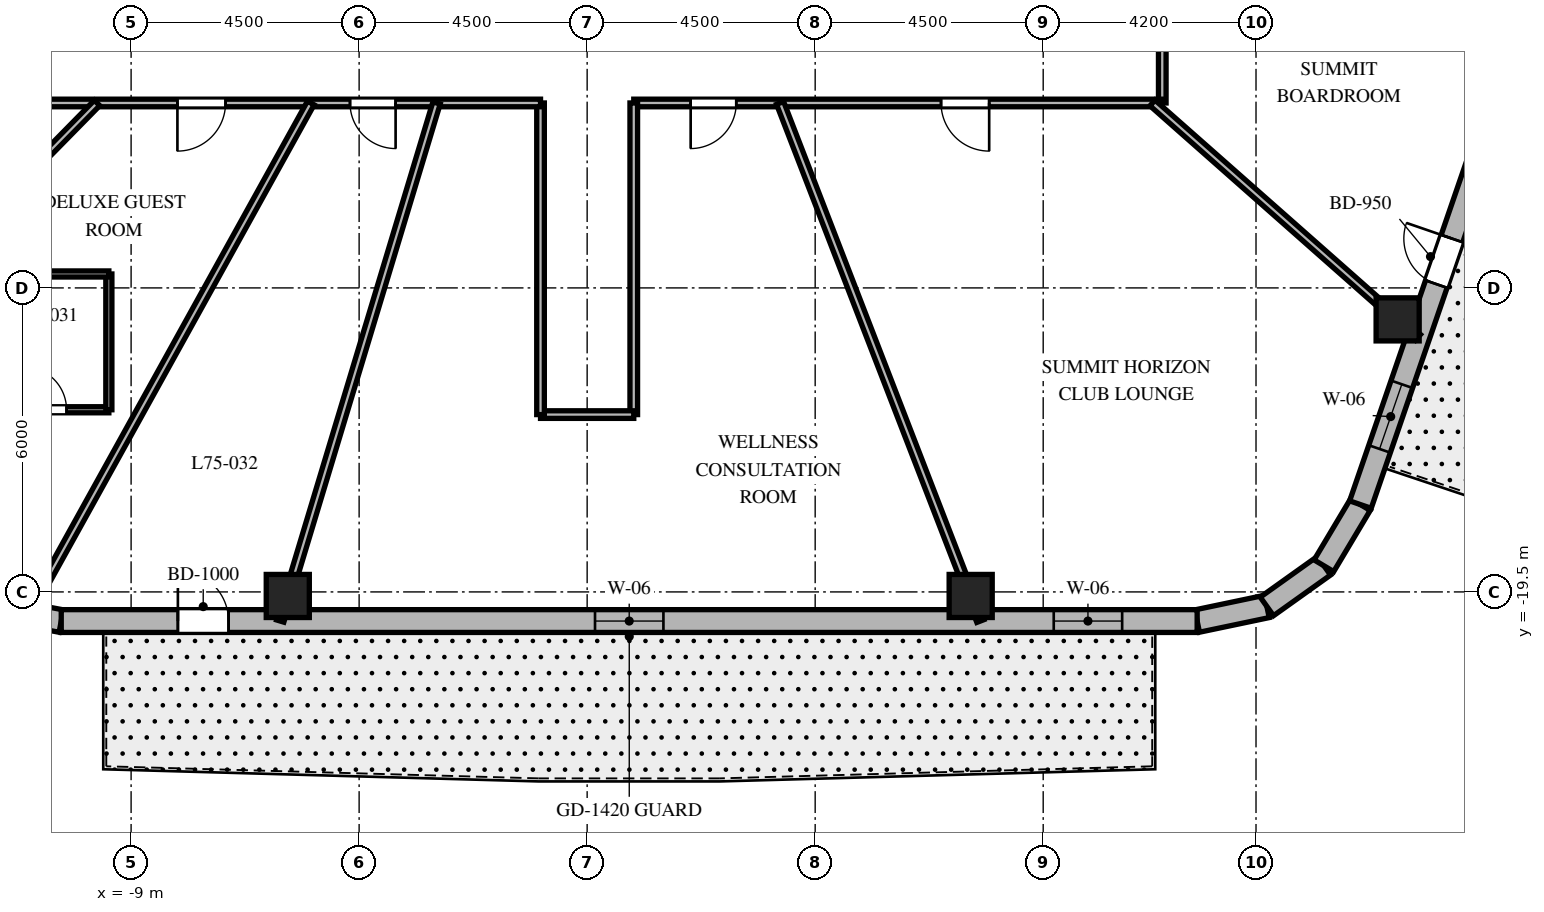
"""IFC4 building model, lengths in metres.
Left out: names, types, materials, properties, quantities, classifications, styles, units other than length and angle.
Written with IfcOpenShell. Run it as: python <this file> out.ifc"""

import sys

from ifc_helpers import new_model, si_unit, direction, frame, frame_2d, origin, origin_2d, place, context, subcontext, project, spatial, rectangle, extrude, element, fill, save


model = new_model("IFC4")
c1 = context("Model", 3, precision=1e-05, world=origin(), true_north=direction((0.0, 1.0)))
c2 = subcontext(c1, "Body", "Model", "MODEL_VIEW")
j1 = project(units=[si_unit("LENGTHUNIT", "METRE"), si_unit("PLANEANGLEUNIT", "RADIAN")], contexts=[c1])
p1 = place(None, origin())
s1 = spatial("IfcSite", under=j1, at=p1, CompositionType="ELEMENT")
p2 = place(p1, origin())
s2 = spatial("IfcBuilding", under=s1, at=p2, CompositionType="ELEMENT")
p3 = place(p2, frame((0.0, 0.0, 301.5)))
s3 = spatial("IfcBuildingStorey", under=s2, at=p3, CompositionType="ELEMENT", Elevation=301.5)
for number, where, z_axis, x_axis in (
    (1, (-5.908, -19.58, 0.0), (0.0, 0.0, 1.0), (1.0, 0.0, 0.0)),
    (2, (7.569, -19.58, 0.0), (0.0, 0.0, 1.0), (1.0, 0.0, 0.0)),
    (3, (15.995, -14.121, 0.0), (0.0, 0.0, 1.0), (1.0, 0.0, 0.0)),
):
    element("IfcColumn", number, at=place(p3, frame(where, z_axis=z_axis, x_axis=x_axis)), inside=s3, PredefinedType="COLUMN", context=c2, shape_type="SweptSolid", body=[
        extrude(rectangle(XDim=0.85, YDim=0.85, at=origin_2d()), origin(), (0.0, 0.0, 1.0), 3.9),
    ])
p4 = place(p3, frame((-11.626, -19.84, 0.0), z_axis=(0.0, 0.0, 1.0), x_axis=(0.982701956681, -0.185194126083, 0.0)))
e4 = element("IfcWall", 4, at=p4, inside=s3, PredefinedType="SOLIDWALL", context=c2, shape_type="SweptSolid", body=[
    extrude(rectangle(XDim=1.27, YDim=0.45, at=frame_2d((0.635, 0.0))), origin(), (0.0, 0.0, 1.0), 3.58),
])
p5 = place(p3, frame((12.038, -20.075, 0.0), z_axis=(0.0, 0.0, 1.0), x_axis=(0.978750122553, 0.205056571711, 0.0)))
e5 = element("IfcWall", 5, at=p5, inside=s3, PredefinedType="SOLIDWALL", context=c2, shape_type="SweptSolid", body=[
    extrude(rectangle(XDim=1.406, YDim=0.45, at=frame_2d((0.703, 0.0))), origin(), (0.0, 0.0, 1.0), 3.58),
])
p6 = place(p3, frame((13.415, -19.787, 0.0), z_axis=(0.0, 0.0, 1.0), x_axis=(0.814055493997, 0.580787097561, 0.0)))
e6 = element("IfcWall", 6, at=p6, inside=s3, PredefinedType="SOLIDWALL", context=c2, shape_type="SweptSolid", body=[
    extrude(rectangle(XDim=1.383, YDim=0.45, at=frame_2d((0.691, 0.0))), origin(), (0.0, 0.0, 1.0), 3.58),
])
p7 = place(p3, frame((14.54, -18.984, 0.0), z_axis=(0.0, 0.0, 1.0), x_axis=(0.512374906623, 0.858761873317, 0.0)))
e7 = element("IfcWall", 7, at=p7, inside=s3, PredefinedType="SOLIDWALL", context=c2, shape_type="SweptSolid", body=[
    extrude(rectangle(XDim=1.406, YDim=0.45, at=frame_2d((0.703, 0.0))), origin(), (0.0, 0.0, 1.0), 3.58),
])
p8 = place(p3, frame((-10.379, -20.075, 0.0), z_axis=(0.0, 0.0, 1.0), x_axis=(1.0, 0.0, 0.0)))
e8 = element("IfcWall", 8, at=p8, inside=s3, PredefinedType="SOLIDWALL", context=c2, shape_type="SweptSolid", body=[
    extrude(rectangle(XDim=22.417, YDim=0.45, at=frame_2d((11.208, 0.0))), origin(), (0.0, 0.0, 1.0), 3.58),
])
p9 = place(p8, frame((2.302, 0.0, 0.0)))
e9 = element("IfcOpeningElement", 9, at=p9, cuts=e8, PredefinedType="OPENING", context=c2, shape_type="SweptSolid", body=[
    extrude(rectangle(XDim=1.0, YDim=2.15, at=frame_2d((0.5, 1.075))), frame((0.0, 0.235, 0.0), z_axis=(0.0, -1.0, 0.0), x_axis=(1.0, 0.0, 0.0)), (0.0, 0.0, 1.0), 0.47),
])
p10 = place(p8, frame((10.534, 0.0, 0.8)))
e10 = element("IfcOpeningElement", 10, at=p10, cuts=e8, PredefinedType="OPENING", context=c2, shape_type="SweptSolid", body=[
    extrude(rectangle(XDim=1.35, YDim=1.75, at=frame_2d((0.675, 0.875))), frame((0.0, 0.235, 0.0), z_axis=(0.0, -1.0, 0.0), x_axis=(1.0, 0.0, 0.0)), (0.0, 0.0, 1.0), 0.47),
])
p11 = place(p8, frame((19.587, 0.0, 0.8)))
e11 = element("IfcOpeningElement", 11, at=p11, cuts=e8, PredefinedType="OPENING", context=c2, shape_type="SweptSolid", body=[
    extrude(rectangle(XDim=1.35, YDim=1.75, at=frame_2d((0.675, 0.875))), frame((0.0, 0.235, 0.0), z_axis=(0.0, -1.0, 0.0), x_axis=(1.0, 0.0, 0.0)), (0.0, 0.0, 1.0), 0.47),
])
p12 = place(p3, frame((15.26, -17.776, 0.0), z_axis=(0.0, 0.0, 1.0), x_axis=(0.325407437101, 0.945573899745, 0.0)))
e12 = element("IfcWall", 12, at=p12, inside=s3, PredefinedType="SOLIDWALL", context=c2, shape_type="SweptSolid", body=[
    extrude(rectangle(XDim=18.552, YDim=0.45, at=frame_2d((9.276, 0.0))), origin(), (0.0, 0.0, 1.0), 3.58),
])
p13 = place(p12, frame((4.602, 0.0, 0.0)))
e13 = element("IfcOpeningElement", 13, at=p13, cuts=e12, PredefinedType="OPENING", context=c2, shape_type="SweptSolid", body=[
    extrude(rectangle(XDim=0.95, YDim=2.15, at=frame_2d((0.475, 1.075))), frame((0.0, 0.235, 0.0), z_axis=(0.0, -1.0, 0.0), x_axis=(1.0, 0.0, 0.0)), (0.0, 0.0, 1.0), 0.47),
])
p14 = place(p12, frame((1.161, 0.0, 0.8)))
e14 = element("IfcOpeningElement", 14, at=p14, cuts=e12, PredefinedType="OPENING", context=c2, shape_type="SweptSolid", body=[
    extrude(rectangle(XDim=1.35, YDim=1.75, at=frame_2d((0.675, 0.875))), frame((0.0, 0.235, 0.0), z_axis=(0.0, -1.0, 0.0), x_axis=(1.0, 0.0, 0.0)), (0.0, 0.0, 1.0), 0.47),
])
p15 = place(p12, frame((8.548, 0.0, 0.8)))
e15 = element("IfcOpeningElement", 15, at=p15, cuts=e12, PredefinedType="OPENING", context=c2, shape_type="SweptSolid", body=[
    extrude(rectangle(XDim=1.35, YDim=1.75, at=frame_2d((0.675, 0.875))), frame((0.0, 0.235, 0.0), z_axis=(0.0, -1.0, 0.0), x_axis=(1.0, 0.0, 0.0)), (0.0, 0.0, 1.0), 0.47),
])
p16 = place(p12, frame((15.987, 0.0, 0.8)))
e16 = element("IfcOpeningElement", 16, at=p16, cuts=e12, PredefinedType="OPENING", context=c2, shape_type="SweptSolid", body=[
    extrude(rectangle(XDim=1.35, YDim=1.75, at=frame_2d((0.675, 0.875))), frame((0.0, 0.235, 0.0), z_axis=(0.0, -1.0, 0.0), x_axis=(1.0, 0.0, 0.0)), (0.0, 0.0, 1.0), 0.47),
])
p17 = place(p3, frame((11.35, -4.4, 0.0), z_axis=(0.0, 0.0, 1.0), x_axis=(0.0, -1.0, 0.0)))
e17 = element("IfcWall", 17, at=p17, inside=s3, PredefinedType="PARTITIONING", context=c2, shape_type="SweptSolid", body=[
    extrude(rectangle(XDim=5.45, YDim=0.15, at=frame_2d((2.725, 0.0))), origin(), (0.0, 0.0, 1.0), 2.17),
])
p18 = place(p3, frame((11.35, -9.85, 0.0), z_axis=(0.0, 0.0, 1.0), x_axis=(-1.0, 0.0, 0.0)))
e18 = element("IfcWall", 18, at=p18, inside=s3, PredefinedType="PARTITIONING", context=c2, shape_type="SweptSolid", body=[
    extrude(rectangle(XDim=10.43, YDim=0.15, at=frame_2d((5.215, 0.0))), origin(), (0.0, 0.0, 1.0), 2.17),
])
p19 = place(p18, frame((8.407, 0.0, 0.0)))
e19 = element("IfcOpeningElement", 19, at=p19, cuts=e18, PredefinedType="OPENING", context=c2, shape_type="SweptSolid", body=[
    extrude(rectangle(XDim=0.9, YDim=2.03, at=frame_2d((0.45, 1.015))), frame((0.0, 0.085, 0.0), z_axis=(0.0, -1.0, 0.0), x_axis=(1.0, 0.0, 0.0)), (0.0, 0.0, 1.0), 0.17),
])
p20 = place(p18, frame((3.416, 0.0, 0.0)))
e20 = element("IfcOpeningElement", 20, at=p20, cuts=e18, PredefinedType="OPENING", context=c2, shape_type="SweptSolid", body=[
    extrude(rectangle(XDim=0.95, YDim=2.03, at=frame_2d((0.475, 1.015))), frame((0.0, 0.085, 0.0), z_axis=(0.0, -1.0, 0.0), x_axis=(1.0, 0.0, 0.0)), (0.0, 0.0, 1.0), 0.17),
])
p21 = place(p3, frame((0.92, -9.85, 0.0), z_axis=(0.0, 0.0, 1.0), x_axis=(0.0, -1.0, 0.0)))
e21 = element("IfcWall", 21, at=p21, inside=s3, PredefinedType="PARTITIONING", context=c2, shape_type="SweptSolid", body=[
    extrude(rectangle(XDim=6.15, YDim=0.15, at=frame_2d((3.075, 0.0))), origin(), (0.0, 0.0, 1.0), 3.021),
])
p22 = place(p3, frame((0.92, -16.0, 0.0), z_axis=(0.0, 0.0, 1.0), x_axis=(-1.0, 0.0, 0.0)))
e22 = element("IfcWall", 22, at=p22, inside=s3, PredefinedType="PARTITIONING", context=c2, shape_type="SweptSolid", body=[
    extrude(rectangle(XDim=1.84, YDim=0.15, at=frame_2d((0.92, 0.0))), origin(), (0.0, 0.0, 1.0), 3.58),
])
p23 = place(p3, frame((-0.92, -16.0, 0.0), z_axis=(0.0, 0.0, 1.0), x_axis=(0.0, 1.0, 0.0)))
e23 = element("IfcWall", 23, at=p23, inside=s3, PredefinedType="PARTITIONING", context=c2, shape_type="SweptSolid", body=[
    extrude(rectangle(XDim=6.15, YDim=0.15, at=frame_2d((3.075, 0.0))), origin(), (0.0, 0.0, 1.0), 3.021),
])
p24 = place(p3, frame((-0.92, -9.85, 0.0), z_axis=(0.0, 0.0, 1.0), x_axis=(-1.0, 0.0, 0.0)))
e24 = element("IfcWall", 24, at=p24, inside=s3, PredefinedType="PARTITIONING", context=c2, shape_type="SweptSolid", body=[
    extrude(rectangle(XDim=10.43, YDim=0.15, at=frame_2d((5.215, 0.0))), origin(), (0.0, 0.0, 1.0), 2.17),
])
p25 = place(p24, frame((6.216, 0.0, 0.0)))
e25 = element("IfcOpeningElement", 25, at=p25, cuts=e24, PredefinedType="OPENING", context=c2, shape_type="SweptSolid", body=[
    extrude(rectangle(XDim=0.95, YDim=2.03, at=frame_2d((0.475, 1.015))), frame((0.0, 0.085, 0.0), z_axis=(0.0, -1.0, 0.0), x_axis=(1.0, 0.0, 0.0)), (0.0, 0.0, 1.0), 0.17),
])
p26 = place(p24, frame((2.86, 0.0, 0.0)))
e26 = element("IfcOpeningElement", 26, at=p26, cuts=e24, PredefinedType="OPENING", context=c2, shape_type="SweptSolid", body=[
    extrude(rectangle(XDim=0.9, YDim=2.03, at=frame_2d((0.45, 1.015))), frame((0.0, 0.085, 0.0), z_axis=(0.0, -1.0, 0.0), x_axis=(1.0, 0.0, 0.0)), (0.0, 0.0, 1.0), 0.17),
])
p27 = place(p3, frame((-9.672, -9.85, 0.0), z_axis=(0.0, 0.0, 1.0), x_axis=(-0.700629771301, -0.713524998558, 0.0)))
e27 = element("IfcWall", 27, at=p27, inside=s3, PredefinedType="PARTITIONING", context=c2, shape_type="SweptSolid", body=[
    extrude(rectangle(XDim=7.459, YDim=0.15, at=frame_2d((3.73, 0.0))), origin(), (0.0, 0.0, 1.0), 2.17),
])
p28 = place(p3, frame((-5.454, -9.85, 0.0), z_axis=(0.0, 0.0, 1.0), x_axis=(-0.48439420613, -0.874849846012, 0.0)))
e28 = element("IfcWall", 28, at=p28, inside=s3, PredefinedType="PARTITIONING", context=c2, shape_type="SweptSolid", body=[
    extrude(rectangle(XDim=11.375, YDim=0.15, at=frame_2d((5.688, 0.0))), origin(), (0.0, 0.0, 1.0), 2.17),
])
p29 = place(p3, frame((-2.972, -9.85, 0.0), z_axis=(0.0, 0.0, 1.0), x_axis=(-0.288872169679, -0.957367677324, 0.0)))
e29 = element("IfcWall", 29, at=p29, inside=s3, PredefinedType="PARTITIONING", context=c2, shape_type="SweptSolid", body=[
    extrude(rectangle(XDim=10.68, YDim=0.15, at=frame_2d((5.34, 0.0))), origin(), (0.0, 0.0, 1.0), 2.17),
])
p30 = place(p3, frame((3.808, -9.85, 0.0), z_axis=(0.0, 0.0, 1.0), x_axis=(0.360587327934, -0.932725457427, 0.0)))
e30 = element("IfcWall", 30, at=p30, inside=s3, PredefinedType="PARTITIONING", context=c2, shape_type="SweptSolid", body=[
    extrude(rectangle(XDim=10.962, YDim=0.15, at=frame_2d((5.481, 0.0))), origin(), (0.0, 0.0, 1.0), 2.17),
])
p31 = place(p3, frame((11.157, -9.85, 0.0), z_axis=(0.0, 0.0, 1.0), x_axis=(0.74966962095, -0.661812253909, 0.0)))
e31 = element("IfcWall", 31, at=p31, inside=s3, PredefinedType="PARTITIONING", context=c2, shape_type="SweptSolid", body=[
    extrude(rectangle(XDim=6.989, YDim=0.15, at=frame_2d((3.494, 0.0))), origin(), (0.0, 0.0, 1.0), 2.17),
])
p32 = place(p3, frame((-11.959, -15.905, 0.0), z_axis=(0.0, 0.0, 1.0), x_axis=(1.0, 0.0, 0.0)))
e32 = element("IfcWall", 32, at=p32, inside=s3, PredefinedType="PARTITIONING", context=c2, shape_type="SweptSolid", body=[
    extrude(rectangle(XDim=2.52, YDim=0.12, at=frame_2d((1.26, 0.0))), origin(), (0.0, 0.0, 1.0), 2.17),
])
p33 = place(p32, frame((0.835, 0.0, 0.0)))
e33 = element("IfcOpeningElement", 33, at=p33, cuts=e32, PredefinedType="OPENING", context=c2, shape_type="SweptSolid", body=[
    extrude(rectangle(XDim=0.85, YDim=2.03, at=frame_2d((0.425, 1.015))), frame((0.0, 0.07, 0.0), z_axis=(0.0, -1.0, 0.0), x_axis=(1.0, 0.0, 0.0)), (0.0, 0.0, 1.0), 0.14),
])
p34 = place(p3, frame((-9.439, -15.905, 0.0), z_axis=(0.0, 0.0, 1.0), x_axis=(0.0, 1.0, 0.0)))
e34 = element("IfcWall", 34, at=p34, inside=s3, PredefinedType="PARTITIONING", context=c2, shape_type="SweptSolid", body=[
    extrude(rectangle(XDim=2.68, YDim=0.12, at=frame_2d((1.34, 0.0))), origin(), (0.0, 0.0, 1.0), 3.152),
])
p35 = place(p3, frame((-9.439, -13.225, 0.0), z_axis=(0.0, 0.0, 1.0), x_axis=(-1.0, 0.0, 0.0)))
e35 = element("IfcWall", 35, at=p35, inside=s3, PredefinedType="PARTITIONING", context=c2, shape_type="SweptSolid", body=[
    extrude(rectangle(XDim=2.52, YDim=0.12, at=frame_2d((1.26, 0.0))), origin(), (0.0, 0.0, 1.0), 3.152),
])
p36 = place(p9, origin())
e36 = element("IfcDoor", 36, at=p36, inside=s3, OperationType="SINGLE_SWING_LEFT", PredefinedType="DOOR", context=c2, shape_type="SweptSolid", body=[
    extrude(rectangle(XDim=1.0, YDim=2.15, at=frame_2d((0.5, 1.075))), frame((0.0, 0.025, 0.0), z_axis=(0.0, -1.0, 0.0), x_axis=(1.0, 0.0, 0.0)), (0.0, 0.0, 1.0), 0.05),
])
fill(e9, e36)
p37 = place(p10, origin())
e37 = element("IfcWindow", 37, at=p37, inside=s3, PartitioningType="SINGLE_PANEL", PredefinedType="WINDOW", context=c2, shape_type="SweptSolid", body=[
    extrude(rectangle(XDim=1.35, YDim=1.75, at=frame_2d((0.675, 0.875))), frame((0.0, 0.03, 0.0), z_axis=(0.0, -1.0, 0.0), x_axis=(1.0, 0.0, 0.0)), (0.0, 0.0, 1.0), 0.06),
])
fill(e10, e37)
p38 = place(p11, origin())
e38 = element("IfcWindow", 38, at=p38, inside=s3, PartitioningType="SINGLE_PANEL", PredefinedType="WINDOW", context=c2, shape_type="SweptSolid", body=[
    extrude(rectangle(XDim=1.35, YDim=1.75, at=frame_2d((0.675, 0.875))), frame((0.0, 0.03, 0.0), z_axis=(0.0, -1.0, 0.0), x_axis=(1.0, 0.0, 0.0)), (0.0, 0.0, 1.0), 0.06),
])
fill(e11, e38)
p39 = place(p13, origin())
e39 = element("IfcDoor", 39, at=p39, inside=s3, OperationType="SINGLE_SWING_RIGHT", PredefinedType="DOOR", context=c2, shape_type="SweptSolid", body=[
    extrude(rectangle(XDim=0.95, YDim=2.15, at=frame_2d((0.475, 1.075))), frame((0.0, 0.025, 0.0), z_axis=(0.0, -1.0, 0.0), x_axis=(1.0, 0.0, 0.0)), (0.0, 0.0, 1.0), 0.05),
])
fill(e13, e39)
p40 = place(p14, origin())
e40 = element("IfcWindow", 40, at=p40, inside=s3, PartitioningType="SINGLE_PANEL", PredefinedType="WINDOW", context=c2, shape_type="SweptSolid", body=[
    extrude(rectangle(XDim=1.35, YDim=1.75, at=frame_2d((0.675, 0.875))), frame((0.0, 0.03, 0.0), z_axis=(0.0, -1.0, 0.0), x_axis=(1.0, 0.0, 0.0)), (0.0, 0.0, 1.0), 0.06),
])
fill(e14, e40)
p41 = place(p25, origin())
e41 = element("IfcDoor", 41, at=p41, inside=s3, OperationType="SINGLE_SWING_RIGHT", PredefinedType="DOOR", context=c2, shape_type="SweptSolid", body=[
    extrude(rectangle(XDim=0.95, YDim=2.03, at=frame_2d((0.475, 1.015))), frame((0.0, 0.025, 0.0), z_axis=(0.0, -1.0, 0.0), x_axis=(1.0, 0.0, 0.0)), (0.0, 0.0, 1.0), 0.05),
])
fill(e25, e41)
p42 = place(p33, origin())
e42 = element("IfcDoor", 42, at=p42, inside=s3, OperationType="SINGLE_SWING_LEFT", PredefinedType="DOOR", context=c2, shape_type="SweptSolid", body=[
    extrude(rectangle(XDim=0.85, YDim=2.03, at=frame_2d((0.425, 1.015))), frame((0.0, 0.025, 0.0), z_axis=(0.0, -1.0, 0.0), x_axis=(1.0, 0.0, 0.0)), (0.0, 0.0, 1.0), 0.05),
])
fill(e33, e42)
p43 = place(p26, origin())
e43 = element("IfcDoor", 43, at=p43, inside=s3, OperationType="SINGLE_SWING_LEFT", PredefinedType="DOOR", context=c2, shape_type="SweptSolid", body=[
    extrude(rectangle(XDim=0.9, YDim=2.03, at=frame_2d((0.45, 1.015))), frame((0.0, 0.025, 0.0), z_axis=(0.0, -1.0, 0.0), x_axis=(1.0, 0.0, 0.0)), (0.0, 0.0, 1.0), 0.05),
])
fill(e26, e43)
p44 = place(p19, origin())
e44 = element("IfcDoor", 44, at=p44, inside=s3, OperationType="SINGLE_SWING_RIGHT", PredefinedType="DOOR", context=c2, shape_type="SweptSolid", body=[
    extrude(rectangle(XDim=0.9, YDim=2.03, at=frame_2d((0.45, 1.015))), frame((0.0, 0.025, 0.0), z_axis=(0.0, -1.0, 0.0), x_axis=(1.0, 0.0, 0.0)), (0.0, 0.0, 1.0), 0.05),
])
fill(e19, e44)
p45 = place(p20, origin())
e45 = element("IfcDoor", 45, at=p45, inside=s3, OperationType="SINGLE_SWING_LEFT", PredefinedType="DOOR", context=c2, shape_type="SweptSolid", body=[
    extrude(rectangle(XDim=0.95, YDim=2.03, at=frame_2d((0.475, 1.015))), frame((0.0, 0.025, 0.0), z_axis=(0.0, -1.0, 0.0), x_axis=(1.0, 0.0, 0.0)), (0.0, 0.0, 1.0), 0.05),
])
fill(e20, e45)
save(model, sys.argv[1])
